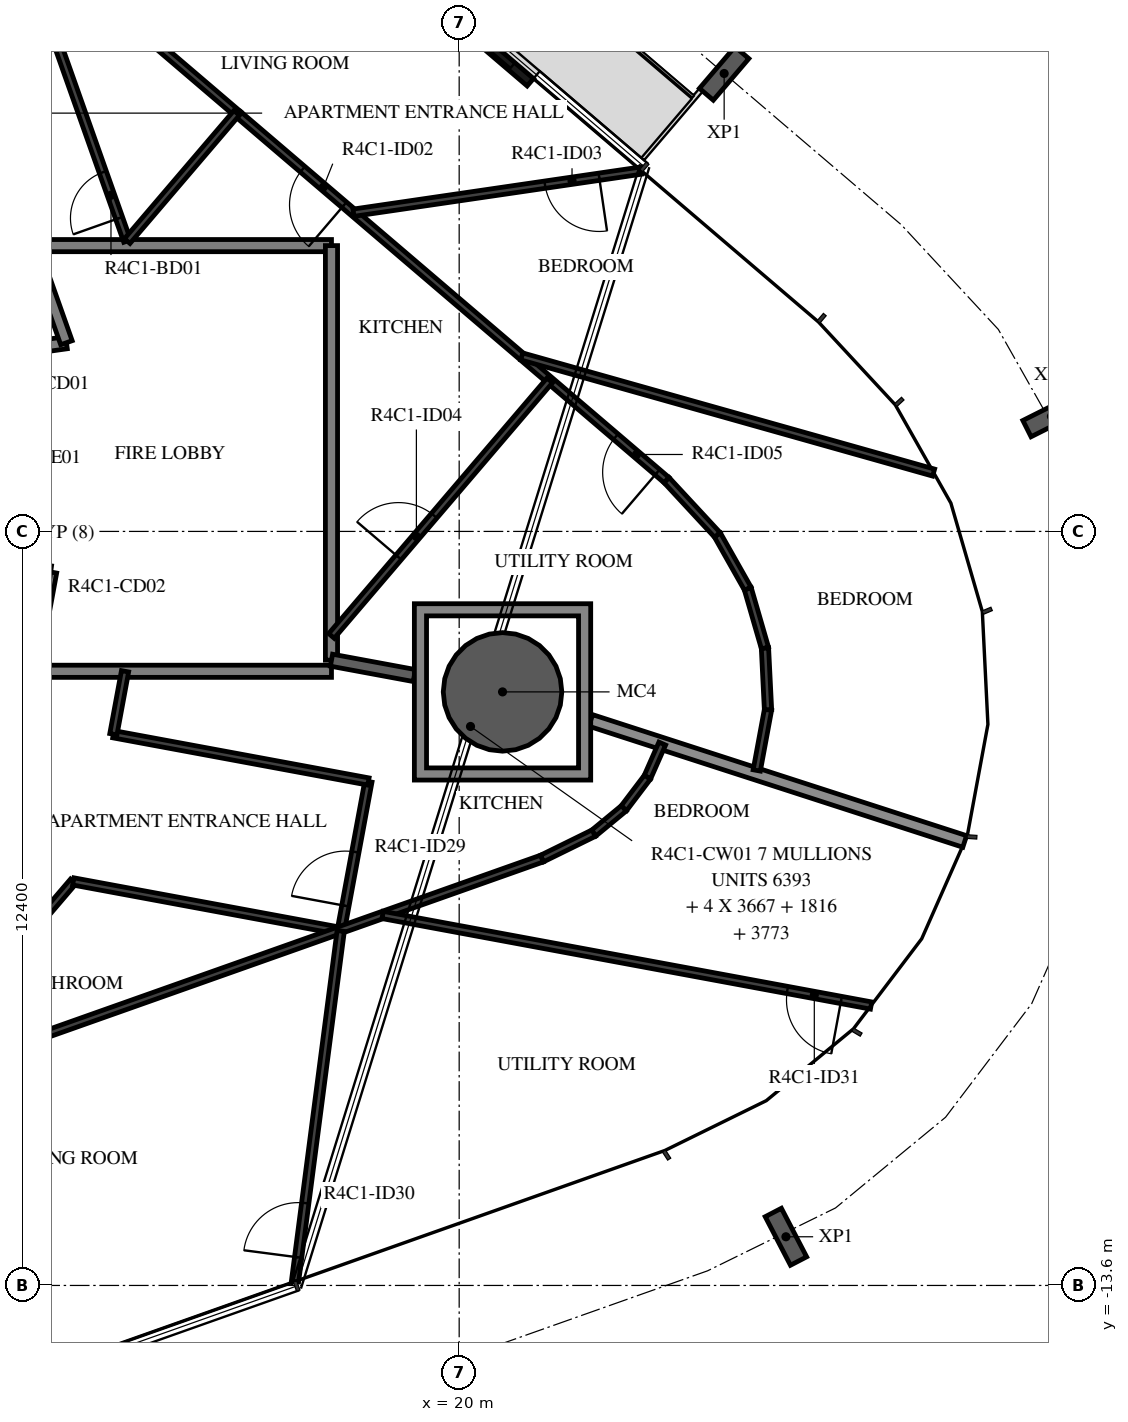
"""IFC4 building model, lengths in metres.
Left out: names, types, materials, properties, quantities, classifications, styles, units other than length and angle.
Written with IfcOpenShell. Run it as: python <this file> out.ifc"""

import sys

from ifc_helpers import new_model, si_unit, direction, frame, frame_2d, origin, origin_2d, place, context, subcontext, project, spatial, polyline, rectangle, hollow_circle, i_section, outline, extrude, element, fill, save


model = new_model("IFC4")
c1 = context("Model", 3, precision=1e-05, world=origin(), true_north=direction((0.0, 1.0)))
c2 = subcontext(c1, "Body", "Model", "MODEL_VIEW")
j1 = project(units=[si_unit("LENGTHUNIT", "METRE"), si_unit("PLANEANGLEUNIT", "RADIAN")], contexts=[c1])
p1 = place(None, origin())
s1 = spatial("IfcSite", under=j1, at=p1, CompositionType="ELEMENT")
p2 = place(p1, origin())
s2 = spatial("IfcBuilding", under=s1, at=p2, CompositionType="ELEMENT")
p3 = place(p2, frame((0.0, 0.0, 176.2)))
s3 = spatial("IfcBuildingStorey", under=s2, at=p3, CompositionType="ELEMENT", Elevation=176.2)
p4 = place(p3, frame((20.713, -3.839, -0.38), z_axis=(0.0, 0.0, 1.0), x_axis=(1.0, 0.0, 0.0)))
e1 = element("IfcColumn", 1, at=p4, inside=s3, PredefinedType="COLUMN", context=c2, shape_type="SweptSolid", body=[
    extrude(hollow_circle(Radius=0.975, WallThickness=0.045, at=origin_2d()), origin(), (0.0, 0.0, 1.0), 3.5),
])
for number, where, z_axis, x_axis in (
    (2, (25.374, -12.799, -0.38), (0.0, 0.0, 1.0), (-0.887, -0.461, 0.0)),
    (3, (29.74, 0.692, -0.38), (0.0, 0.0, 1.0), (0.449, -0.894, 0.0)),
    (4, (24.358, 6.331, -0.38), (0.0, 0.0, 1.0), (0.76, -0.649, 0.0)),
):
    element("IfcColumn", number, at=place(p3, frame(where, z_axis=z_axis, x_axis=x_axis)), inside=s3, PredefinedType="COLUMN", context=c2, shape_type="SweptSolid", body=[
        extrude(i_section(OverallWidth=0.3, OverallDepth=0.9, WebThickness=0.019, FlangeThickness=0.035, FilletRadius=0.03, at=origin_2d()), origin(), (0.0, 0.0, 1.0), 3.5),
    ])
p5 = place(p3, frame((21.17, 6.186, 0.0), z_axis=(0.0, 0.0, 1.0), x_axis=(-0.760359548534, 0.649502391799, 0.0)))
e5 = element("IfcWall", 5, at=p5, inside=s3, PredefinedType="STANDARD", context=c2, shape_type="SweptSolid", body=[
    extrude(rectangle(XDim=3.2, YDim=0.16, at=frame_2d((1.6, 0.0))), origin(), (0.0, 0.0, 1.0), 3.12),
])
p6 = place(p5, frame((0.4, 0.0, 0.0)))
e6 = element("IfcOpeningElement", 6, at=p6, cuts=e5, PredefinedType="OPENING", context=c2, shape_type="SweptSolid", body=[
    extrude(rectangle(XDim=2.4, YDim=2.4, at=frame_2d((1.2, 1.2))), frame((0.0, 0.09, 0.0), z_axis=(0.0, -1.0, 0.0), x_axis=(1.0, 0.0, 0.0)), (0.0, 0.0, 1.0), 0.18),
])
p7 = place(p3, frame((11.87, 1.668, 0.0), z_axis=(0.0, 0.0, 1.0), x_axis=(0.990270910415, 0.139152879904, 0.0)))
e7 = element("IfcWall", 7, at=p7, inside=s3, PredefinedType="STANDARD", context=c2, shape_type="SweptSolid", body=[
    extrude(rectangle(XDim=1.688, YDim=0.2, at=frame_2d((0.844, 0.0))), origin(), (0.0, 0.0, 1.0), 3.12),
])
p8 = place(p7, frame((0.11, 0.0, 0.0)))
e8 = element("IfcOpeningElement", 8, at=p8, cuts=e7, PredefinedType="OPENING", context=c2, shape_type="SweptSolid", body=[
    extrude(rectangle(XDim=1.2, YDim=2.1, at=frame_2d((0.6, 1.05))), frame((0.0, 0.11, 0.0), z_axis=(0.0, -1.0, 0.0), x_axis=(1.0, 0.0, 0.0)), (0.0, 0.0, 1.0), 0.22),
])
p9 = place(p3, frame((13.542, 1.903, 0.0), z_axis=(0.0, 0.0, 1.0), x_axis=(-0.333808508206, 0.942640907159, 0.0)))
e9 = element("IfcWall", 9, at=p9, inside=s3, PredefinedType="STANDARD", context=c2, shape_type="SweptSolid", body=[
    extrude(rectangle(XDim=6.317, YDim=0.2, at=frame_2d((3.158, 0.0))), origin(), (0.0, 0.0, 1.0), 3.12),
])
p10 = place(p3, frame((12.521, -5.972, 0.0), z_axis=(0.0, 0.0, 1.0), x_axis=(0.182244189886, 0.983253301674, 0.0)))
e10 = element("IfcWall", 10, at=p10, inside=s3, PredefinedType="STANDARD", context=c2, shape_type="SweptSolid", body=[
    extrude(rectangle(XDim=4.176, YDim=0.2, at=frame_2d((2.088, 0.0))), origin(), (0.0, 0.0, 1.0), 3.12),
])
p11 = place(p10, frame((2.645, 0.0, 0.0)))
e11 = element("IfcOpeningElement", 11, at=p11, cuts=e10, PredefinedType="OPENING", context=c2, shape_type="SweptSolid", body=[
    extrude(rectangle(XDim=1.2, YDim=2.1, at=frame_2d((0.6, 1.05))), frame((0.0, 0.11, 0.0), z_axis=(0.0, -1.0, 0.0), x_axis=(1.0, 0.0, 0.0)), (0.0, 0.0, 1.0), 0.22),
])
p12 = place(p3, frame((17.9, 3.5, 0.0), z_axis=(0.0, 0.0, 1.0), x_axis=(-1.0, 0.0, 0.0)))
e12 = element("IfcWall", 12, at=p12, inside=s3, PredefinedType="STANDARD", context=c2, shape_type="SweptSolid", body=[
    extrude(rectangle(XDim=4.924, YDim=0.2, at=frame_2d((2.462, 0.0))), origin(), (0.0, 0.0, 1.0), 3.12),
])
p13 = place(p3, frame((17.9, -3.318, 0.0), z_axis=(0.0, 0.0, 1.0), x_axis=(0.0, 1.0, 0.0)))
e13 = element("IfcWall", 13, at=p13, inside=s3, PredefinedType="STANDARD", context=c2, shape_type="SweptSolid", body=[
    extrude(rectangle(XDim=6.818, YDim=0.2, at=frame_2d((3.409, 0.0))), origin(), (0.0, 0.0, 1.0), 3.12),
])
p14 = place(p3, frame((12.979, -3.5, 0.0), z_axis=(0.0, 0.0, 1.0), x_axis=(1.0, 0.0, 0.0)))
e14 = element("IfcWall", 14, at=p14, inside=s3, PredefinedType="STANDARD", context=c2, shape_type="SweptSolid", body=[
    extrude(rectangle(XDim=4.92, YDim=0.2, at=frame_2d((2.46, 0.0))), origin(), (0.0, 0.0, 1.0), 3.12),
])
p15 = place(p3, frame((22.163, -4.308, 0.0), z_axis=(0.0, 0.0, 1.0), x_axis=(0.951422718769, -0.307887658426, 0.0)))
e15 = element("IfcWall", 15, at=p15, inside=s3, PredefinedType="STANDARD", context=c2, shape_type="SweptSolid", body=[
    extrude(rectangle(XDim=6.464, YDim=0.2, at=frame_2d((3.232, 0.0))), origin(), (0.0, 0.0, 1.0), 2.73),
])
p16 = place(p3, frame((17.9, -3.318, 0.0), z_axis=(0.0, 0.0, 1.0), x_axis=(0.983252800712, -0.182246892682, 0.0)))
e16 = element("IfcWall", 16, at=p16, inside=s3, PredefinedType="STANDARD", context=c2, shape_type="SweptSolid", body=[
    extrude(rectangle(XDim=1.386, YDim=0.2, at=frame_2d((0.693, 0.0))), origin(), (0.0, 0.0, 1.0), 3.12),
])
p17 = place(p3, frame((14.541, 3.575, 0.0), z_axis=(0.0, 0.0, 1.0), x_axis=(-0.333799280318, 0.942644174893, 0.0)))
e17 = element("IfcWall", 17, at=p17, inside=s3, PredefinedType="PARTITIONING", context=c2, shape_type="SweptSolid", body=[
    extrude(rectangle(XDim=5.477, YDim=0.12, at=frame_2d((2.738, 0.0))), origin(), (0.0, 0.0, 1.0), 3.12),
])
p18 = place(p17, frame((0.4, 0.0, 0.0)))
e18 = element("IfcOpeningElement", 18, at=p18, cuts=e17, PredefinedType="OPENING", context=c2, shape_type="SweptSolid", body=[
    extrude(rectangle(XDim=0.8, YDim=2.1, at=frame_2d((0.4, 1.05))), frame((0.0, 0.07, 0.0), z_axis=(0.0, -1.0, 0.0), x_axis=(1.0, 0.0, 0.0)), (0.0, 0.0, 1.0), 0.14),
])
p19 = place(p3, frame((12.734, 8.762, 0.0), z_axis=(0.0, 0.0, 1.0), x_axis=(0.760390484255, -0.649466174219, 0.0)))
e19 = element("IfcWall", 19, at=p19, inside=s3, PredefinedType="PARTITIONING", context=c2, shape_type="SweptSolid", body=[
    extrude(rectangle(XDim=4.783, YDim=0.12, at=frame_2d((2.391, 0.0))), origin(), (0.0, 0.0, 1.0), 3.12),
])
p20 = place(p3, frame((23.411, -0.357, 0.0), z_axis=(0.0, 0.0, 1.0), x_axis=(-0.76041871148, 0.649433124525, 0.0)))
e20 = element("IfcWall", 20, at=p20, inside=s3, PredefinedType="PARTITIONING", context=c2, shape_type="SweptSolid", body=[
    extrude(rectangle(XDim=9.259, YDim=0.12, at=frame_2d((4.629, 0.0))), origin(), (0.0, 0.0, 1.0), 3.12),
])
p21 = place(p20, frame((6.972, 0.0, 0.0)))
e21 = element("IfcOpeningElement", 21, at=p21, cuts=e20, PredefinedType="OPENING", context=c2, shape_type="SweptSolid", body=[
    extrude(rectangle(XDim=0.9, YDim=2.1, at=frame_2d((0.45, 1.05))), frame((0.0, 0.07, 0.0), z_axis=(0.0, -1.0, 0.0), x_axis=(1.0, 0.0, 0.0)), (0.0, 0.0, 1.0), 0.14),
])
p22 = place(p20, frame((0.2, 0.0, 0.0)))
e22 = element("IfcOpeningElement", 22, at=p22, cuts=e20, PredefinedType="OPENING", context=c2, shape_type="SweptSolid", body=[
    extrude(rectangle(XDim=0.9, YDim=2.1, at=frame_2d((0.45, 1.05))), frame((0.0, 0.07, 0.0), z_axis=(0.0, -1.0, 0.0), x_axis=(1.0, 0.0, 0.0)), (0.0, 0.0, 1.0), 0.14),
])
p23 = place(p3, frame((16.341, 5.682, 0.0), z_axis=(0.0, 0.0, 1.0), x_axis=(-0.64946993237, -0.76038727432, 0.0)))
e23 = element("IfcWall", 23, at=p23, inside=s3, PredefinedType="PARTITIONING", context=c2, shape_type="SweptSolid", body=[
    extrude(rectangle(XDim=2.771, YDim=0.12, at=frame_2d((1.386, 0.0))), origin(), (0.0, 0.0, 1.0), 3.12),
])
p24 = place(p3, frame((17.9, -2.918, 0.0), z_axis=(0.0, 0.0, 1.0), x_axis=(0.649469887983, 0.760387312232, 0.0)))
e24 = element("IfcWall", 24, at=p24, inside=s3, PredefinedType="PARTITIONING", context=c2, shape_type="SweptSolid", body=[
    extrude(rectangle(XDim=5.527, YDim=0.12, at=frame_2d((2.763, 0.0))), origin(), (0.0, 0.0, 1.0), 3.12),
])
p25 = place(p24, frame((1.7, 0.0, 0.0)))
e25 = element("IfcOpeningElement", 25, at=p25, cuts=e24, PredefinedType="OPENING", context=c2, shape_type="SweptSolid", body=[
    extrude(rectangle(XDim=0.9, YDim=2.1, at=frame_2d((0.45, 1.05))), frame((0.0, 0.07, 0.0), z_axis=(0.0, -1.0, 0.0), x_axis=(1.0, 0.0, 0.0)), (0.0, 0.0, 1.0), 0.14),
])
p26 = place(p3, frame((22.994, 4.734, 0.0), z_axis=(0.0, 0.0, 1.0), x_axis=(-0.989449286977, -0.144879634529, 0.0)))
e26 = element("IfcWall", 26, at=p26, inside=s3, PredefinedType="PARTITIONING", context=c2, shape_type="SweptSolid", body=[
    extrude(rectangle(XDim=4.782, YDim=0.12, at=frame_2d((2.391, 0.0))), origin(), (0.0, 0.0, 1.0), 3.12),
])
p27 = place(p26, frame((0.7, 0.0, 0.0)))
e27 = element("IfcOpeningElement", 27, at=p27, cuts=e26, PredefinedType="OPENING", context=c2, shape_type="SweptSolid", body=[
    extrude(rectangle(XDim=0.9, YDim=2.1, at=frame_2d((0.45, 1.05))), frame((0.0, 0.07, 0.0), z_axis=(0.0, -1.0, 0.0), x_axis=(1.0, 0.0, 0.0)), (0.0, 0.0, 1.0), 0.14),
])
p28 = place(p3, frame((21.029, 1.677, 0.0), z_axis=(0.0, 0.0, 1.0), x_axis=(0.962458274539, -0.271429677396, 0.0)))
e28 = element("IfcWall", 28, at=p28, inside=s3, PredefinedType="PARTITIONING", context=c2, shape_type="SweptSolid", body=[
    extrude(rectangle(XDim=7.037, YDim=0.12, at=frame_2d((3.519, 0.0))), origin(), (0.0, 0.0, 1.0), 3.12),
])
for number, where, z_axis, x_axis in (
    (29, (24.894, -5.131, 0.0), (0.0, 0.0, 1.0), (0.182, 0.983, 0.0)),
    (30, (25.079, -4.132, 0.0), (0.0, 0.0, 1.0), (-0.049, 0.999, 0.0)),
):
    element("IfcWall", number, at=place(p3, frame(where, z_axis=z_axis, x_axis=x_axis)), inside=s3, PredefinedType="PARTITIONING", context=c2, shape_type="SweptSolid", body=[
        extrude(rectangle(XDim=1.016, YDim=0.12, at=frame_2d((0.508, 0.0))), origin(), (0.0, 0.0, 1.0), 3.12),
    ])
for number, where, z_axis, x_axis in (
    (31, (25.029, -3.117, 0.0), (0.0, 0.0, 1.0), (-0.279, 0.96, 0.0)),
    (32, (24.746, -2.141, 0.0), (0.0, 0.0, 1.0), (-0.492, 0.87, 0.0)),
):
    element("IfcWall", number, at=place(p3, frame(where, z_axis=z_axis, x_axis=x_axis)), inside=s3, PredefinedType="PARTITIONING", context=c2, shape_type="SweptSolid", body=[
        extrude(rectangle(XDim=1.016, YDim=0.12, at=frame_2d((0.508, 0.0))), origin(), (0.0, 0.0, 1.0), 3.12),
    ])
p29 = place(p3, frame((24.246, -1.257, 0.0), z_axis=(0.0, 0.0, 1.0), x_axis=(-0.679840361176, 0.733360132074, 0.0)))
e33 = element("IfcWall", 33, at=p29, inside=s3, PredefinedType="PARTITIONING", context=c2, shape_type="SweptSolid", body=[
    extrude(rectangle(XDim=1.227, YDim=0.12, at=frame_2d((0.614, 0.0))), origin(), (0.0, 0.0, 1.0), 3.12),
])
p30 = place(p3, frame((8.737, -12.713, 0.0), z_axis=(0.0, 0.0, 1.0), x_axis=(0.649427973074, 0.760423111031, 0.0)))
e34 = element("IfcWall", 34, at=p30, inside=s3, PredefinedType="PARTITIONING", context=c2, shape_type="SweptSolid", body=[
    extrude(rectangle(XDim=7.571, YDim=0.12, at=frame_2d((3.785, 0.0))), origin(), (0.0, 0.0, 1.0), 3.12),
])
p31 = place(p30, frame((0.2, 0.0, 0.0)))
e35 = element("IfcOpeningElement", 35, at=p31, cuts=e34, PredefinedType="OPENING", context=c2, shape_type="SweptSolid", body=[
    extrude(rectangle(XDim=0.9, YDim=2.1, at=frame_2d((0.45, 1.05))), frame((0.0, 0.07, 0.0), z_axis=(0.0, -1.0, 0.0), x_axis=(1.0, 0.0, 0.0)), (0.0, 0.0, 1.0), 0.14),
])
p32 = place(p30, frame((4.634, 0.0, 0.0)))
e36 = element("IfcOpeningElement", 36, at=p32, cuts=e34, PredefinedType="OPENING", context=c2, shape_type="SweptSolid", body=[
    extrude(rectangle(XDim=0.8, YDim=2.1, at=frame_2d((0.4, 1.05))), frame((0.0, 0.07, 0.0), z_axis=(0.0, -1.0, 0.0), x_axis=(1.0, 0.0, 0.0)), (0.0, 0.0, 1.0), 0.14),
])
p33 = place(p3, frame((13.654, -6.956, 0.0), z_axis=(0.0, 0.0, 1.0), x_axis=(0.983253166233, -0.18224492062, 0.0)))
e37 = element("IfcWall", 37, at=p33, inside=s3, PredefinedType="PARTITIONING", context=c2, shape_type="SweptSolid", body=[
    extrude(rectangle(XDim=4.437, YDim=0.12, at=frame_2d((2.218, 0.0))), origin(), (0.0, 0.0, 1.0), 3.12),
])
p34 = place(p3, frame((18.055, -7.75, 0.0), z_axis=(0.0, 0.0, 1.0), x_axis=(0.18225497314, 0.983251302957, 0.0)))
e38 = element("IfcWall", 38, at=p34, inside=s3, PredefinedType="PARTITIONING", context=c2, shape_type="SweptSolid", body=[
    extrude(rectangle(XDim=2.479, YDim=0.12, at=frame_2d((1.24, 0.0))), origin(), (0.0, 0.0, 1.0), 3.12),
])
p35 = place(p34, frame((0.4, 0.0, 0.0)))
e39 = element("IfcOpeningElement", 39, at=p35, cuts=e38, PredefinedType="OPENING", context=c2, shape_type="SweptSolid", body=[
    extrude(rectangle(XDim=0.9, YDim=2.1, at=frame_2d((0.45, 1.05))), frame((0.0, 0.07, 0.0), z_axis=(0.0, -1.0, 0.0), x_axis=(1.0, 0.0, 0.0)), (0.0, 0.0, 1.0), 0.14),
])
p36 = place(p3, frame((18.507, -5.312, 0.0), z_axis=(0.0, 0.0, 1.0), x_axis=(-0.983254286603, 0.182238875868, 0.0)))
e40 = element("IfcWall", 40, at=p36, inside=s3, PredefinedType="PARTITIONING", context=c2, shape_type="SweptSolid", body=[
    extrude(rectangle(XDim=4.266, YDim=0.12, at=frame_2d((2.133, 0.0))), origin(), (0.0, 0.0, 1.0), 3.12),
])
p37 = place(p3, frame((14.313, -4.535, 0.0), z_axis=(0.0, 0.0, 1.0), x_axis=(0.182271946033, 0.983248156718, 0.0)))
e41 = element("IfcWall", 41, at=p37, inside=s3, PredefinedType="PARTITIONING", context=c2, shape_type="SweptSolid", body=[
    extrude(rectangle(XDim=1.053, YDim=0.12, at=frame_2d((0.526, 0.0))), origin(), (0.0, 0.0, 1.0), 3.12),
])
p38 = place(p3, frame((21.362, -6.58, 0.0), z_axis=(0.0, 0.0, 1.0), x_axis=(-0.942647598157, -0.333789612913, 0.0)))
e42 = element("IfcWall", 42, at=p38, inside=s3, PredefinedType="PARTITIONING", context=c2, shape_type="SweptSolid", body=[
    extrude(rectangle(XDim=11.234, YDim=0.12, at=frame_2d((5.617, 0.0))), origin(), (0.0, 0.0, 1.0), 3.12),
])
p39 = place(p3, frame((17.3, -13.534, 0.0), z_axis=(0.0, 0.0, 1.0), x_axis=(0.129290698847, 0.99160673414, 0.0)))
e43 = element("IfcWall", 43, at=p39, inside=s3, PredefinedType="PARTITIONING", context=c2, shape_type="SweptSolid", body=[
    extrude(rectangle(XDim=5.812, YDim=0.12, at=frame_2d((2.906, 0.0))), origin(), (0.0, 0.0, 1.0), 3.12),
])
p40 = place(p39, frame((0.4, 0.0, 0.0)))
e44 = element("IfcOpeningElement", 44, at=p40, cuts=e43, PredefinedType="OPENING", context=c2, shape_type="SweptSolid", body=[
    extrude(rectangle(XDim=0.9, YDim=2.1, at=frame_2d((0.45, 1.05))), frame((0.0, 0.07, 0.0), z_axis=(0.0, -1.0, 0.0), x_axis=(1.0, 0.0, 0.0)), (0.0, 0.0, 1.0), 0.14),
])
p41 = place(p3, frame((26.774, -8.997, 0.0), z_axis=(0.0, 0.0, 1.0), x_axis=(-0.983258019748, 0.18221873285, 0.0)))
e45 = element("IfcWall", 45, at=p41, inside=s3, PredefinedType="PARTITIONING", context=c2, shape_type="SweptSolid", body=[
    extrude(rectangle(XDim=8.17, YDim=0.12, at=frame_2d((4.085, 0.0))), origin(), (0.0, 0.0, 1.0), 3.12),
])
p42 = place(p41, frame((0.5, 0.0, 0.0)))
e46 = element("IfcOpeningElement", 46, at=p42, cuts=e45, PredefinedType="OPENING", context=c2, shape_type="SweptSolid", body=[
    extrude(rectangle(XDim=0.9, YDim=2.1, at=frame_2d((0.45, 1.05))), frame((0.0, 0.07, 0.0), z_axis=(0.0, -1.0, 0.0), x_axis=(1.0, 0.0, 0.0)), (0.0, 0.0, 1.0), 0.14),
])
p43 = place(p3, frame((23.34, -4.689, 0.0), z_axis=(0.0, 0.0, 1.0), x_axis=(-0.404077449371, -0.914724775498, 0.0)))
e47 = element("IfcWall", 47, at=p43, inside=s3, PredefinedType="PARTITIONING", context=c2, shape_type="SweptSolid", body=[
    extrude(rectangle(XDim=0.605, YDim=0.12, at=frame_2d((0.302, 0.0))), origin(), (0.0, 0.0, 1.0), 3.12),
])
for number, where, z_axis, x_axis in (
    (48, (23.095, -5.242, 0.0), (0.0, 0.0, 1.0), (-0.604, -0.797, 0.0)),
    (49, (22.708, -5.754, 0.0), (0.0, 0.0, 1.0), (-0.772, -0.636, 0.0)),
):
    element("IfcWall", number, at=place(p3, frame(where, z_axis=z_axis, x_axis=x_axis)), inside=s3, PredefinedType="PARTITIONING", context=c2, shape_type="SweptSolid", body=[
        extrude(rectangle(XDim=0.642, YDim=0.12, at=frame_2d((0.321, 0.0))), origin(), (0.0, 0.0, 1.0), 3.12),
    ])
p44 = place(p3, frame((22.212, -6.162, 0.0), z_axis=(0.0, 0.0, 1.0), x_axis=(-0.897448694974, -0.441118850072, 0.0)))
e50 = element("IfcWall", 50, at=p44, inside=s3, PredefinedType="PARTITIONING", context=c2, shape_type="SweptSolid", body=[
    extrude(rectangle(XDim=0.947, YDim=0.12, at=frame_2d((0.474, 0.0))), origin(), (0.0, 0.0, 1.0), 3.12),
])
p45 = place(p3, origin())
e51 = element("IfcWall", 51, at=p45, inside=s3, PredefinedType="STANDARD", context=c2, shape_type="SweptSolid", body=[
    extrude(outline(polyline([(22.163, -2.389), (22.163, -5.289), (19.263, -5.289), (19.263, -2.389), (22.163, -2.389)]), holes=[polyline([(19.463, -5.089), (21.963, -5.089), (21.963, -2.589), (19.463, -2.589), (19.463, -5.089)])]), origin(), (0.0, 0.0, 1.0), 3.12),
])
p46 = place(p6, origin())
e52 = element("IfcDoor", 52, at=p46, inside=s3, OperationType="DOUBLE_DOOR_SLIDING", PredefinedType="DOOR", context=c2, shape_type="SweptSolid", body=[
    extrude(rectangle(XDim=2.4, YDim=2.4, at=frame_2d((1.2, 1.2))), frame((0.0, 0.025, 0.0), z_axis=(0.0, -1.0, 0.0), x_axis=(1.0, 0.0, 0.0)), (0.0, 0.0, 1.0), 0.05),
])
fill(e6, e52)
p47 = place(p18, origin())
e53 = element("IfcDoor", 53, at=p47, inside=s3, OperationType="SINGLE_SWING_LEFT", PredefinedType="DOOR", context=c2, shape_type="SweptSolid", body=[
    extrude(rectangle(XDim=0.8, YDim=2.1, at=frame_2d((0.4, 1.05))), frame((0.0, 0.025, 0.0), z_axis=(0.0, -1.0, 0.0), x_axis=(1.0, 0.0, 0.0)), (0.0, 0.0, 1.0), 0.05),
])
fill(e18, e53)
p48 = place(p21, origin())
e54 = element("IfcDoor", 54, at=p48, inside=s3, OperationType="SINGLE_SWING_RIGHT", PredefinedType="DOOR", context=c2, shape_type="SweptSolid", body=[
    extrude(rectangle(XDim=0.9, YDim=2.1, at=frame_2d((0.45, 1.05))), frame((0.0, 0.025, 0.0), z_axis=(0.0, -1.0, 0.0), x_axis=(1.0, 0.0, 0.0)), (0.0, 0.0, 1.0), 0.05),
])
fill(e21, e54)
p49 = place(p27, origin())
e55 = element("IfcDoor", 55, at=p49, inside=s3, OperationType="SINGLE_SWING_LEFT", PredefinedType="DOOR", context=c2, shape_type="SweptSolid", body=[
    extrude(rectangle(XDim=0.9, YDim=2.1, at=frame_2d((0.45, 1.05))), frame((0.0, 0.025, 0.0), z_axis=(0.0, -1.0, 0.0), x_axis=(1.0, 0.0, 0.0)), (0.0, 0.0, 1.0), 0.05),
])
fill(e27, e55)
p50 = place(p25, origin())
e56 = element("IfcDoor", 56, at=p50, inside=s3, OperationType="SINGLE_SWING_LEFT", PredefinedType="DOOR", context=c2, shape_type="SweptSolid", body=[
    extrude(rectangle(XDim=0.9, YDim=2.1, at=frame_2d((0.45, 1.05))), frame((0.0, 0.025, 0.0), z_axis=(0.0, -1.0, 0.0), x_axis=(1.0, 0.0, 0.0)), (0.0, 0.0, 1.0), 0.05),
])
fill(e25, e56)
p51 = place(p22, origin())
e57 = element("IfcDoor", 57, at=p51, inside=s3, OperationType="SINGLE_SWING_LEFT", PredefinedType="DOOR", context=c2, shape_type="SweptSolid", body=[
    extrude(rectangle(XDim=0.9, YDim=2.1, at=frame_2d((0.45, 1.05))), frame((0.0, 0.025, 0.0), z_axis=(0.0, -1.0, 0.0), x_axis=(1.0, 0.0, 0.0)), (0.0, 0.0, 1.0), 0.05),
])
fill(e22, e57)
p52 = place(p35, origin())
e58 = element("IfcDoor", 58, at=p52, inside=s3, OperationType="SINGLE_SWING_RIGHT", PredefinedType="DOOR", context=c2, shape_type="SweptSolid", body=[
    extrude(rectangle(XDim=0.9, YDim=2.1, at=frame_2d((0.45, 1.05))), frame((0.0, 0.025, 0.0), z_axis=(0.0, -1.0, 0.0), x_axis=(1.0, 0.0, 0.0)), (0.0, 0.0, 1.0), 0.05),
])
fill(e39, e58)
p53 = place(p40, origin())
e59 = element("IfcDoor", 59, at=p53, inside=s3, OperationType="SINGLE_SWING_RIGHT", PredefinedType="DOOR", context=c2, shape_type="SweptSolid", body=[
    extrude(rectangle(XDim=0.9, YDim=2.1, at=frame_2d((0.45, 1.05))), frame((0.0, 0.025, 0.0), z_axis=(0.0, -1.0, 0.0), x_axis=(1.0, 0.0, 0.0)), (0.0, 0.0, 1.0), 0.05),
])
fill(e44, e59)
p54 = place(p42, origin())
e60 = element("IfcDoor", 60, at=p54, inside=s3, OperationType="SINGLE_SWING_RIGHT", PredefinedType="DOOR", context=c2, shape_type="SweptSolid", body=[
    extrude(rectangle(XDim=0.9, YDim=2.1, at=frame_2d((0.45, 1.05))), frame((0.0, 0.025, 0.0), z_axis=(0.0, -1.0, 0.0), x_axis=(1.0, 0.0, 0.0)), (0.0, 0.0, 1.0), 0.05),
])
fill(e46, e60)
save(model, sys.argv[1])
